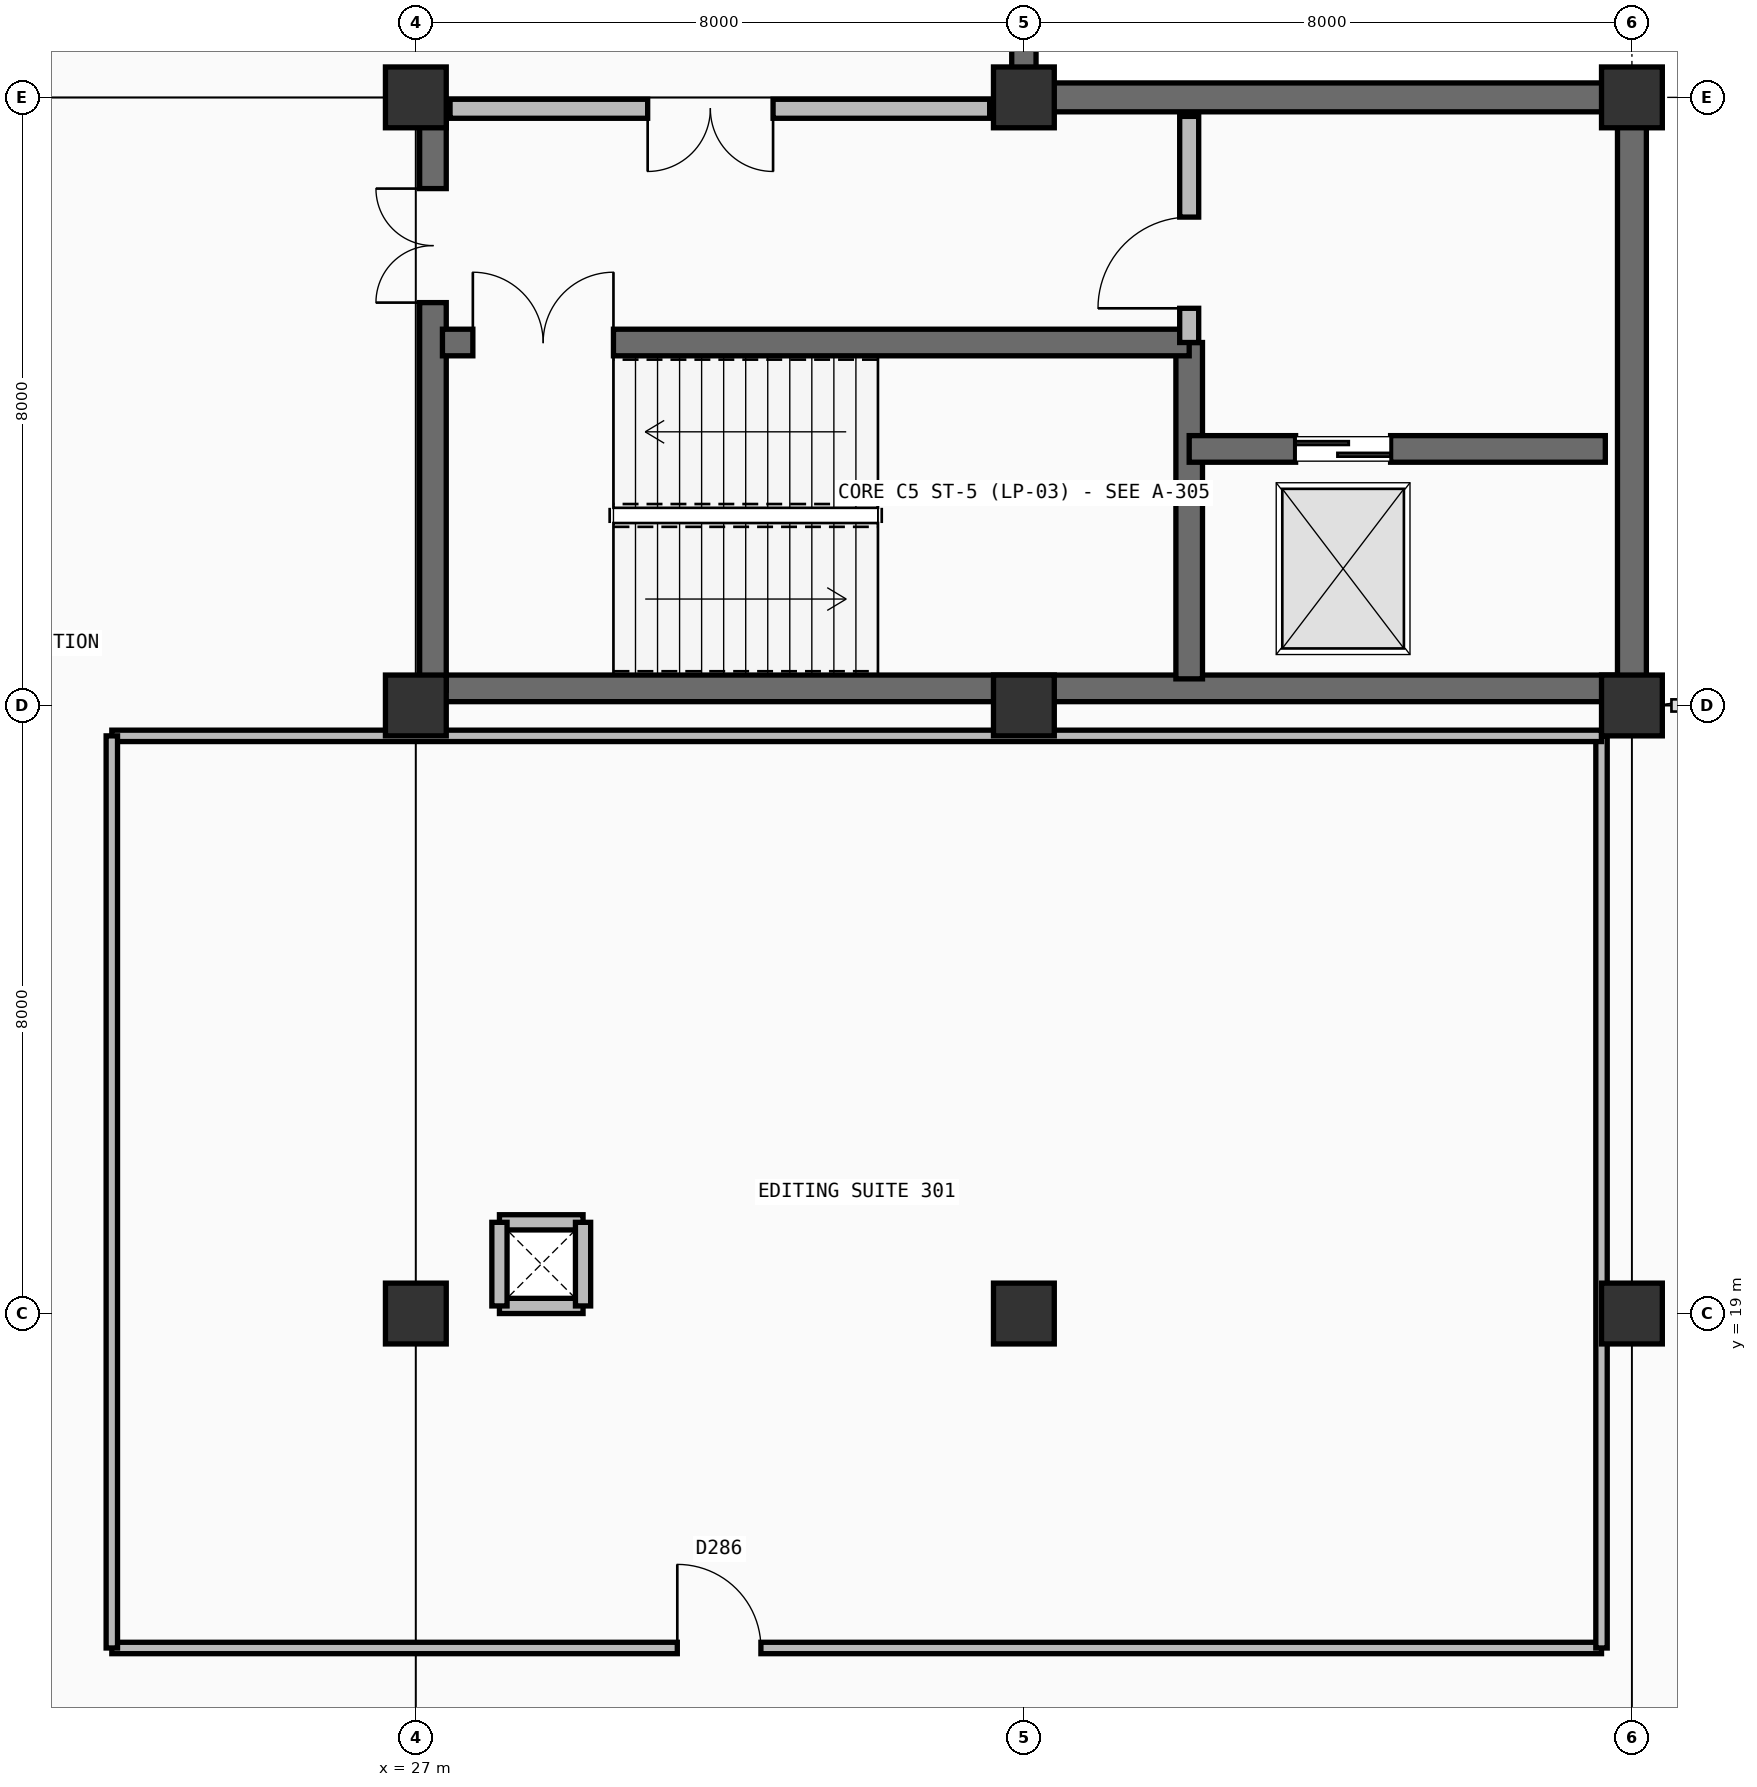
"""IFC4 building model, lengths in metres.
Left out: names, types, materials, properties, quantities, classifications, styles, units other than length and angle.
Written with IfcOpenShell. Run it as: python <this file> out.ifc"""

import sys

from ifc_helpers import new_model, si_unit, direction, frame, frame_2d, origin, origin_2d, place, context, subcontext, project, spatial, rectangle, extrude, element, fill, save


model = new_model("IFC4")
c1 = context("Model", 3, precision=1e-05, world=origin(), true_north=direction((0.0, 1.0)))
c2 = subcontext(c1, "Body", "Model", "MODEL_VIEW")
j1 = project(units=[si_unit("LENGTHUNIT", "METRE"), si_unit("PLANEANGLEUNIT", "RADIAN")], contexts=[c1])
p1 = place(None, origin())
s1 = spatial("IfcSite", under=j1, at=p1, CompositionType="ELEMENT")
p2 = place(p1, origin())
s2 = spatial("IfcBuilding", under=s1, at=p2, CompositionType="ELEMENT")
p3 = place(p2, frame((0.0, 0.0, 14.4)))
s3 = spatial("IfcBuildingStorey", under=s2, at=p3, CompositionType="ELEMENT", Elevation=14.4)
for number, where, z_axis, x_axis in (
    (1, (27.0, 19.0, 0.0), (0.0, 0.0, 1.0), (1.0, 0.0, 0.0)),
    (2, (27.0, 27.0, 0.0), (0.0, 0.0, 1.0), (1.0, 0.0, 0.0)),
    (3, (27.0, 35.0, 0.0), (0.0, 0.0, 1.0), (1.0, 0.0, 0.0)),
    (4, (35.0, 19.0, 0.0), (0.0, 0.0, 1.0), (1.0, 0.0, 0.0)),
    (5, (35.0, 27.0, 0.0), (0.0, 0.0, 1.0), (1.0, 0.0, 0.0)),
    (6, (35.0, 35.0, 0.0), (0.0, 0.0, 1.0), (1.0, 0.0, 0.0)),
    (7, (43.0, 19.0, 0.0), (0.0, 0.0, 1.0), (1.0, 0.0, 0.0)),
    (8, (43.0, 27.0, 0.0), (0.0, 0.0, 1.0), (1.0, 0.0, 0.0)),
    (9, (43.0, 35.0, 0.0), (0.0, 0.0, 1.0), (1.0, 0.0, 0.0)),
):
    element("IfcColumn", number, at=place(p3, frame(where, z_axis=z_axis, x_axis=x_axis)), inside=s3, PredefinedType="COLUMN", context=c2, shape_type="SweptSolid", body=[
        extrude(rectangle(XDim=0.8, YDim=0.8, at=origin_2d()), origin(), (0.0, 0.0, 1.0), 4.5),
    ])
p4 = place(p3, frame((35.0, 43.0, 0.0), z_axis=(0.0, 0.0, 1.0), x_axis=(0.0, -1.0, 0.0)))
e10 = element("IfcWall", 10, at=p4, inside=s3, PredefinedType="SOLIDWALL", context=c2, shape_type="SweptSolid", body=[
    extrude(rectangle(XDim=8.0, YDim=0.32, at=frame_2d((4.0, 0.0))), origin(), (0.0, 0.0, 1.0), 4.5),
])
p5 = place(p4, frame((2.875, 0.0, 1.1)))
e11 = element("IfcOpeningElement", 11, at=p5, cuts=e10, PredefinedType="OPENING", context=c2, shape_type="SweptSolid", body=[
    extrude(rectangle(XDim=2.25, YDim=1.02, at=frame_2d((1.125, 0.51))), frame((0.0, 0.17, 0.0), z_axis=(0.0, -1.0, 0.0), x_axis=(1.0, 0.0, 0.0)), (0.0, 0.0, 1.0), 0.34),
])
for number, where, z_axis, x_axis in (
    (12, (35.0, 35.0, 0.0), (0.0, 0.0, 1.0), (1.0, 0.0, 0.0)),
    (13, (43.0, 35.0, 0.0), (0.0, 0.0, 1.0), (0.0, -1.0, 0.0)),
):
    element("IfcWall", number, at=place(p3, frame(where, z_axis=z_axis, x_axis=x_axis)), inside=s3, PredefinedType="SOLIDWALL", context=c2, shape_type="SweptSolid", body=[
        extrude(rectangle(XDim=8.0, YDim=0.38, at=frame_2d((4.0, 0.0))), origin(), (0.0, 0.0, 1.0), 4.5),
    ])
p6 = place(p3, frame((27.2, 27.225, 0.0), z_axis=(0.0, 0.0, 1.0), x_axis=(1.0, 0.0, 0.0)))
e14 = element("IfcWall", 14, at=p6, inside=s3, PredefinedType="SHEAR", context=c2, shape_type="SweptSolid", body=[
    extrude(rectangle(XDim=15.6, YDim=0.35, at=frame_2d((7.8, 0.0))), origin(), (0.0, 0.0, 1.0), 4.2),
])
p7 = place(p3, frame((27.225, 27.2, 0.0), z_axis=(0.0, 0.0, 1.0), x_axis=(0.0, 1.0, 0.0)))
e15 = element("IfcWall", 15, at=p7, inside=s3, PredefinedType="SHEAR", context=c2, shape_type="SweptSolid", body=[
    extrude(rectangle(XDim=7.6, YDim=0.35, at=frame_2d((3.8, 0.0))), origin(), (0.0, 0.0, 1.0), 4.2),
])
p8 = place(p7, frame((5.1, 0.0, 0.0)))
e16 = element("IfcOpeningElement", 16, at=p8, cuts=e15, PredefinedType="OPENING", context=c2, shape_type="SweptSolid", body=[
    extrude(rectangle(XDim=1.5, YDim=2.2, at=frame_2d((0.75, 1.1))), frame((0.0, 0.185, 0.0), z_axis=(0.0, -1.0, 0.0), x_axis=(1.0, 0.0, 0.0)), (0.0, 0.0, 1.0), 0.37),
])
p9 = place(p3, frame((37.175, 27.35, 0.0), z_axis=(0.0, 0.0, 1.0), x_axis=(0.0, 1.0, 0.0)))
e17 = element("IfcWall", 17, at=p9, inside=s3, PredefinedType="SHEAR", context=c2, shape_type="SweptSolid", body=[
    extrude(rectangle(XDim=4.425, YDim=0.35, at=frame_2d((2.212, 0.0))), origin(), (0.0, 0.0, 1.0), 4.2),
])
p10 = place(p3, frame((27.35, 31.775, 0.0), z_axis=(0.0, 0.0, 1.0), x_axis=(1.0, 0.0, 0.0)))
e18 = element("IfcWall", 18, at=p10, inside=s3, PredefinedType="SHEAR", context=c2, shape_type="SweptSolid", body=[
    extrude(rectangle(XDim=9.825, YDim=0.35, at=frame_2d((4.913, 0.0))), origin(), (0.0, 0.0, 1.0), 4.2),
])
p11 = place(p10, frame((0.4, 0.0, 0.0)))
e19 = element("IfcOpeningElement", 19, at=p11, cuts=e18, PredefinedType="OPENING", context=c2, shape_type="SweptSolid", body=[
    extrude(rectangle(XDim=1.85, YDim=2.25, at=frame_2d((0.925, 1.125))), frame((0.0, 0.185, 0.0), z_axis=(0.0, -1.0, 0.0), x_axis=(1.0, 0.0, 0.0)), (0.0, 0.0, 1.0), 0.37),
])
p12 = place(p3, frame((37.175, 30.375, 0.0), z_axis=(0.0, 0.0, 1.0), x_axis=(1.0, 0.0, 0.0)))
e20 = element("IfcWall", 20, at=p12, inside=s3, PredefinedType="SHEAR", context=c2, shape_type="SweptSolid", body=[
    extrude(rectangle(XDim=5.475, YDim=0.35, at=frame_2d((2.737, 0.0))), origin(), (0.0, 0.0, 1.0), 4.2),
])
p13 = place(p12, frame((1.4, 0.0, 0.0)))
e21 = element("IfcOpeningElement", 21, at=p13, cuts=e20, PredefinedType="OPENING", context=c2, shape_type="SweptSolid", body=[
    extrude(rectangle(XDim=1.25, YDim=2.25, at=frame_2d((0.625, 1.125))), frame((0.0, 0.185, 0.0), z_axis=(0.0, -1.0, 0.0), x_axis=(1.0, 0.0, 0.0)), (0.0, 0.0, 1.0), 0.37),
])
p14 = place(p3, frame((37.175, 31.775, 0.0), z_axis=(0.0, 0.0, 1.0), x_axis=(0.0, 1.0, 0.0)))
e22 = element("IfcWall", 22, at=p14, inside=s3, PredefinedType="PARTITIONING", context=c2, shape_type="SweptSolid", body=[
    extrude(rectangle(XDim=2.975, YDim=0.25, at=frame_2d((1.488, 0.0))), origin(), (0.0, 0.0, 1.0), 4.2),
])
p15 = place(p14, frame((0.45, 0.0, 0.0)))
e23 = element("IfcOpeningElement", 23, at=p15, cuts=e22, PredefinedType="OPENING", context=c2, shape_type="SweptSolid", body=[
    extrude(rectangle(XDim=1.2, YDim=2.2, at=frame_2d((0.6, 1.1))), frame((0.0, 0.135, 0.0), z_axis=(0.0, -1.0, 0.0), x_axis=(1.0, 0.0, 0.0)), (0.0, 0.0, 1.0), 0.27),
])
p16 = place(p3, frame((27.45, 34.85, 0.0), z_axis=(0.0, 0.0, 1.0), x_axis=(1.0, 0.0, 0.0)))
e24 = element("IfcWall", 24, at=p16, inside=s3, PredefinedType="PARTITIONING", context=c2, shape_type="SweptSolid", body=[
    extrude(rectangle(XDim=7.1, YDim=0.25, at=frame_2d((3.55, 0.0))), origin(), (0.0, 0.0, 1.0), 3.535),
])
p17 = place(p16, frame((2.6, 0.0, 0.0)))
e25 = element("IfcOpeningElement", 25, at=p17, cuts=e24, PredefinedType="OPENING", context=c2, shape_type="SweptSolid", body=[
    extrude(rectangle(XDim=1.65, YDim=2.25, at=frame_2d((0.825, 1.125))), frame((0.0, 0.135, 0.0), z_axis=(0.0, -1.0, 0.0), x_axis=(1.0, 0.0, 0.0)), (0.0, 0.0, 1.0), 0.27),
])
p18 = place(p3, frame((23.0, 14.6, 0.0), z_axis=(0.0, 0.0, 1.0), x_axis=(1.0, 0.0, 0.0)))
e26 = element("IfcWall", 26, at=p18, inside=s3, PredefinedType="PARTITIONING", context=c2, shape_type="SweptSolid", body=[
    extrude(rectangle(XDim=19.6, YDim=0.15, at=frame_2d((9.8, 0.0))), origin(), (0.0, 0.0, 1.0), 4.2),
])
p19 = place(p18, frame((7.44, 0.0, 0.0)))
e27 = element("IfcOpeningElement", 27, at=p19, cuts=e26, PredefinedType="OPENING", context=c2, shape_type="SweptSolid", body=[
    extrude(rectangle(XDim=1.1, YDim=2.16, at=frame_2d((0.55, 1.08))), frame((0.0, 0.085, 0.0), z_axis=(0.0, -1.0, 0.0), x_axis=(1.0, 0.0, 0.0)), (0.0, 0.0, 1.0), 0.17),
])
p20 = place(p3, frame((42.6, 14.6, 0.0), z_axis=(0.0, 0.0, 1.0), x_axis=(0.0, 1.0, 0.0)))
e28 = element("IfcWall", 28, at=p20, inside=s3, PredefinedType="PARTITIONING", context=c2, shape_type="SweptSolid", body=[
    extrude(rectangle(XDim=12.0, YDim=0.15, at=frame_2d((6.0, 0.0))), origin(), (0.0, 0.0, 1.0), 3.585),
])
p21 = place(p3, frame((23.0, 26.6, 0.0), z_axis=(0.0, 0.0, 1.0), x_axis=(1.0, 0.0, 0.0)))
e29 = element("IfcWall", 29, at=p21, inside=s3, PredefinedType="PARTITIONING", context=c2, shape_type="SweptSolid", body=[
    extrude(rectangle(XDim=19.6, YDim=0.15, at=frame_2d((9.8, 0.0))), origin(), (0.0, 0.0, 1.0), 3.535),
])
p22 = place(p3, frame((23.0, 14.6, 0.0), z_axis=(0.0, 0.0, 1.0), x_axis=(0.0, 1.0, 0.0)))
e30 = element("IfcWall", 30, at=p22, inside=s3, PredefinedType="PARTITIONING", context=c2, shape_type="SweptSolid", body=[
    extrude(rectangle(XDim=12.0, YDim=0.15, at=frame_2d((6.0, 0.0))), origin(), (0.0, 0.0, 1.0), 3.705),
])
p23 = place(p3, frame((28.1, 19.1, 0.0), z_axis=(0.0, 0.0, 1.0), x_axis=(1.0, 0.0, 0.0)))
e31 = element("IfcWall", 31, at=p23, inside=s3, PredefinedType="PARTITIONING", context=c2, shape_type="SweptSolid", body=[
    extrude(rectangle(XDim=1.1, YDim=0.2, at=frame_2d((0.55, 0.0))), origin(), (0.0, 0.0, 1.0), 3.535),
])
for number, where, z_axis, x_axis in (
    (32, (28.1, 20.2, 0.0), (0.0, 0.0, 1.0), (1.0, 0.0, 0.0)),
    (33, (28.1, 19.1, 0.0), (0.0, 0.0, 1.0), (0.0, 1.0, 0.0)),
    (34, (29.2, 19.1, 0.0), (0.0, 0.0, 1.0), (0.0, 1.0, 0.0)),
):
    element("IfcWall", number, at=place(p3, frame(where, z_axis=z_axis, x_axis=x_axis)), inside=s3, PredefinedType="PARTITIONING", context=c2, shape_type="SweptSolid", body=[
        extrude(rectangle(XDim=1.1, YDim=0.2, at=frame_2d((0.55, 0.0))), origin(), (0.0, 0.0, 1.0), 4.2),
    ])
p24 = place(p11, origin())
e35 = element("IfcDoor", 35, at=p24, inside=s3, OperationType="DOUBLE_DOOR_SINGLE_SWING", PredefinedType="DOOR", context=c2, shape_type="SweptSolid", body=[
    extrude(rectangle(XDim=1.85, YDim=2.25, at=frame_2d((0.925, 1.125))), frame((0.0, 0.025, 0.0), z_axis=(0.0, -1.0, 0.0), x_axis=(1.0, 0.0, 0.0)), (0.0, 0.0, 1.0), 0.05),
])
fill(e19, e35)
p25 = place(p13, origin())
e36 = element("IfcDoor", 36, at=p25, inside=s3, OperationType="DOUBLE_DOOR_SLIDING", PredefinedType="DOOR", context=c2, shape_type="SweptSolid", body=[
    extrude(rectangle(XDim=1.25, YDim=2.25, at=frame_2d((0.625, 1.125))), frame((0.0, 0.025, 0.0), z_axis=(0.0, -1.0, 0.0), x_axis=(1.0, 0.0, 0.0)), (0.0, 0.0, 1.0), 0.05),
])
fill(e21, e36)
p26 = place(p15, origin())
e37 = element("IfcDoor", 37, at=p26, inside=s3, OperationType="SINGLE_SWING_LEFT", PredefinedType="DOOR", context=c2, shape_type="SweptSolid", body=[
    extrude(rectangle(XDim=1.2, YDim=2.2, at=frame_2d((0.6, 1.1))), frame((0.0, 0.025, 0.0), z_axis=(0.0, -1.0, 0.0), x_axis=(1.0, 0.0, 0.0)), (0.0, 0.0, 1.0), 0.05),
])
fill(e23, e37)
p27 = place(p17, frame((1.65, 0.0, 0.0), z_axis=(0.0, 0.0, 1.0), x_axis=(-1.0, 0.0, 0.0)))
e38 = element("IfcDoor", 38, at=p27, inside=s3, OperationType="DOUBLE_DOOR_SINGLE_SWING", PredefinedType="DOOR", context=c2, shape_type="SweptSolid", body=[
    extrude(rectangle(XDim=1.65, YDim=2.25, at=frame_2d((0.825, 1.125))), frame((0.0, 0.025, 0.0), z_axis=(0.0, -1.0, 0.0), x_axis=(1.0, 0.0, 0.0)), (0.0, 0.0, 1.0), 0.05),
])
fill(e25, e38)
p28 = place(p8, origin())
e39 = element("IfcDoor", 39, at=p28, inside=s3, OperationType="DOUBLE_DOOR_SINGLE_SWING", PredefinedType="DOOR", context=c2, shape_type="SweptSolid", body=[
    extrude(rectangle(XDim=1.5, YDim=2.2, at=frame_2d((0.75, 1.1))), frame((0.0, 0.025, 0.0), z_axis=(0.0, -1.0, 0.0), x_axis=(1.0, 0.0, 0.0)), (0.0, 0.0, 1.0), 0.05),
])
fill(e16, e39)
p29 = place(p19, origin())
e40 = element("IfcDoor", 40, at=p29, inside=s3, OperationType="SINGLE_SWING_LEFT", PredefinedType="DOOR", context=c2, shape_type="SweptSolid", body=[
    extrude(rectangle(XDim=1.1, YDim=2.16, at=frame_2d((0.55, 1.08))), frame((0.0, 0.025, 0.0), z_axis=(0.0, -1.0, 0.0), x_axis=(1.0, 0.0, 0.0)), (0.0, 0.0, 1.0), 0.05),
])
fill(e27, e40)
save(model, sys.argv[1])
